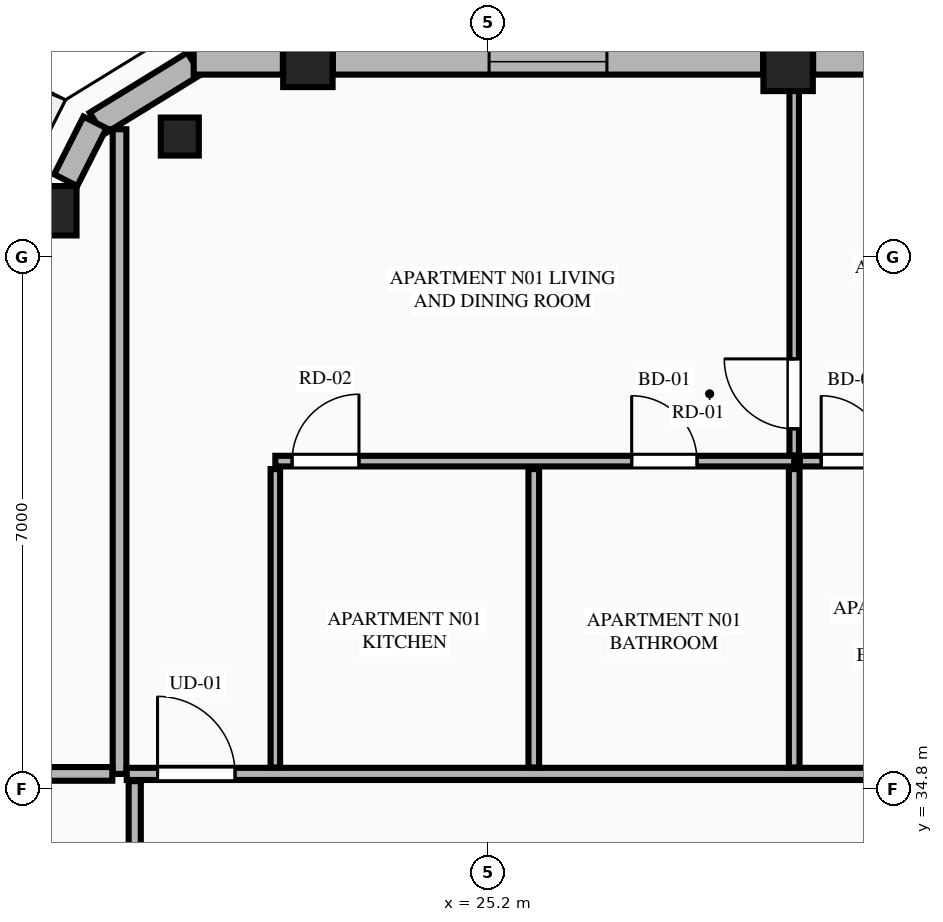
"""IFC4 building model, lengths in metres.
Left out: names, types, materials, properties, quantities, classifications, styles, units other than length and angle.
Written with IfcOpenShell. Run it as: python <this file> out.ifc"""

import sys

from ifc_helpers import new_model, si_unit, direction, frame, frame_2d, origin, origin_2d, place, context, subcontext, project, spatial, rectangle, extrude, element, fill, save


model = new_model("IFC4")
c1 = context("Model", 3, precision=1e-05, world=origin(), true_north=direction((0.0, 1.0)))
c2 = subcontext(c1, "Body", "Model", "MODEL_VIEW")
j1 = project(units=[si_unit("LENGTHUNIT", "METRE"), si_unit("PLANEANGLEUNIT", "RADIAN")], contexts=[c1])
p1 = place(None, origin())
s1 = spatial("IfcSite", under=j1, at=p1, CompositionType="ELEMENT")
p2 = place(p1, origin())
s2 = spatial("IfcBuilding", under=s1, at=p2, CompositionType="ELEMENT")
p3 = place(p2, frame((0.0, 0.0, 259.85)))
s3 = spatial("IfcBuildingStorey", under=s2, at=p3, CompositionType="ELEMENT", Elevation=259.85)
for number, where, z_axis, x_axis in (
    (1, (29.146, 44.308, 0.0), (0.0, 0.0, 1.0), (1.0, 0.0, 0.0)),
    (2, (22.828, 44.361, 0.0), (0.0, 0.0, 1.0), (1.0, 0.0, 0.0)),
    (3, (19.459, 42.409, 0.0), (0.0, 0.0, 1.0), (1.0, 0.0, 0.0)),
):
    element("IfcColumn", number, at=place(p3, frame(where, z_axis=z_axis, x_axis=x_axis)), inside=s3, PredefinedType="COLUMN", context=c2, shape_type="SweptSolid", body=[
        extrude(rectangle(XDim=0.65, YDim=0.65, at=origin_2d()), origin(), (0.0, 0.0, 1.0), 3.65),
    ])
p4 = place(p3, frame((21.143, 43.385, 0.0), z_axis=(0.0, 0.0, 1.0), x_axis=(-0.865256437757, -0.501329529272, 0.0)))
e4 = element("IfcColumn", 4, at=p4, inside=s3, PredefinedType="PILASTER", context=c2, shape_type="SweptSolid", body=[
    extrude(rectangle(XDim=0.5, YDim=0.35, at=origin_2d()), origin(), (0.0, 0.0, 1.0), 3.65),
])
p5 = place(p3, frame((21.331, 44.345, 0.0), z_axis=(0.0, 0.0, 1.0), x_axis=(-0.851680557619, -0.52406128246, 0.0)))
e5 = element("IfcWall", 5, at=p5, inside=s3, PredefinedType="STANDARD", context=c2, shape_type="SweptSolid", body=[
    extrude(rectangle(XDim=1.508, YDim=0.34, at=frame_2d((0.754, 0.0))), origin(), (0.0, 0.0, 1.0), 3.45),
])
p6 = place(p3, frame((35.325, 44.37, 0.0), z_axis=(0.0, 0.0, 1.0), x_axis=(-1.0, 0.0, 0.0)))
e6 = element("IfcWall", 6, at=p6, inside=s3, PredefinedType="STANDARD", context=c2, shape_type="SweptSolid", body=[
    extrude(rectangle(XDim=5.85, YDim=0.34, at=frame_2d((2.925, 0.0))), origin(), (0.0, 0.0, 1.0), 2.983),
])
p7 = place(p6, frame((2.375, 0.0, 0.75)))
e7 = element("IfcOpeningElement", 7, at=p7, cuts=e6, PredefinedType="OPENING", context=c2, shape_type="SweptSolid", body=[
    extrude(rectangle(XDim=1.1, YDim=2.0, at=frame_2d((0.55, 1.0))), frame((0.0, 0.18, 0.0), z_axis=(0.0, -1.0, 0.0), x_axis=(1.0, 0.0, 0.0)), (0.0, 0.0, 1.0), 0.36),
])
p8 = place(p3, frame((28.817, 44.37, 0.0), z_axis=(0.0, 0.0, 1.0), x_axis=(-1.0, 0.0, 0.0)))
e8 = element("IfcWall", 8, at=p8, inside=s3, PredefinedType="STANDARD", context=c2, shape_type="SweptSolid", body=[
    extrude(rectangle(XDim=5.66, YDim=0.34, at=frame_2d((2.83, 0.0))), origin(), (0.0, 0.0, 1.0), 2.983),
])
p9 = place(p8, frame((2.055, 0.0, 0.75)))
e9 = element("IfcOpeningElement", 9, at=p9, cuts=e8, PredefinedType="OPENING", context=c2, shape_type="SweptSolid", body=[
    extrude(rectangle(XDim=1.55, YDim=2.05, at=frame_2d((0.775, 1.025))), frame((0.0, 0.18, 0.0), z_axis=(0.0, -1.0, 0.0), x_axis=(1.0, 0.0, 0.0)), (0.0, 0.0, 1.0), 0.36),
])
p10 = place(p3, frame((22.499, 44.37, 0.0), z_axis=(0.0, 0.0, 1.0), x_axis=(-1.0, 0.0, 0.0)))
e10 = element("IfcWall", 10, at=p10, inside=s3, PredefinedType="STANDARD", context=c2, shape_type="SweptSolid", body=[
    extrude(rectangle(XDim=1.173, YDim=0.34, at=frame_2d((0.586, 0.0))), origin(), (0.0, 0.0, 1.0), 3.45),
])
p11 = place(p3, frame((20.027, 43.571, 0.0), z_axis=(0.0, 0.0, 1.0), x_axis=(-0.451907025977, -0.8920650424, 0.0)))
e11 = element("IfcWall", 11, at=p11, inside=s3, PredefinedType="STANDARD", context=c2, shape_type="SweptSolid", body=[
    extrude(rectangle(XDim=0.852, YDim=0.34, at=frame_2d((0.426, 0.0))), origin(), (0.0, 0.0, 1.0), 3.45),
])
p12 = place(p3, frame((20.35, 35.0, 0.0), z_axis=(0.0, 0.0, 1.0), x_axis=(0.0, 1.0, 0.0)))
e12 = element("IfcWall", 12, at=p12, inside=s3, PredefinedType="PARTITIONING", context=c2, shape_type="SweptSolid", body=[
    extrude(rectangle(XDim=8.481, YDim=0.18, at=frame_2d((4.24, 0.0))), origin(), (0.0, 0.0, 1.0), 3.45),
])
p13 = place(p3, frame((20.445, 35.0, 0.0), z_axis=(0.0, 0.0, 1.0), x_axis=(1.0, 0.0, 0.0)))
e13 = element("IfcWall", 13, at=p13, inside=s3, PredefinedType="PARTITIONING", context=c2, shape_type="SweptSolid", body=[
    extrude(rectangle(XDim=15.114, YDim=0.16, at=frame_2d((7.557, 0.0))), origin(), (0.0, 0.0, 1.0), 3.45),
])
p14 = place(p13, frame((0.405, 0.0, 0.0)))
e14 = element("IfcOpeningElement", 14, at=p14, cuts=e13, PredefinedType="OPENING", context=c2, shape_type="SweptSolid", body=[
    extrude(rectangle(XDim=1.02, YDim=2.25, at=frame_2d((0.51, 1.125))), frame((0.0, 0.09, 0.0), z_axis=(0.0, -1.0, 0.0), x_axis=(1.0, 0.0, 0.0)), (0.0, 0.0, 1.0), 0.18),
])
p15 = place(p3, frame((22.4, 35.085, 0.0), z_axis=(0.0, 0.0, 1.0), x_axis=(0.0, 1.0, 0.0)))
e15 = element("IfcWall", 15, at=p15, inside=s3, PredefinedType="PARTITIONING", context=c2, shape_type="SweptSolid", body=[
    extrude(rectangle(XDim=3.925, YDim=0.125, at=frame_2d((1.962, 0.0))), origin(), (0.0, 0.0, 1.0), 3.45),
])
p16 = place(p3, frame((22.4, 39.115, 0.0), z_axis=(0.0, 0.0, 1.0), x_axis=(1.0, 0.0, 0.0)))
e16 = element("IfcWall", 16, at=p16, inside=s3, PredefinedType="PLUMBINGWALL", context=c2, shape_type="SweptSolid", body=[
    extrude(rectangle(XDim=6.826, YDim=0.14, at=frame_2d((3.413, 0.0))), origin(), (0.0, 0.0, 1.0), 3.45),
])
p17 = place(p16, frame((4.688, 0.0, 0.0)))
e17 = element("IfcOpeningElement", 17, at=p17, cuts=e16, PredefinedType="OPENING", context=c2, shape_type="SweptSolid", body=[
    extrude(rectangle(XDim=0.86, YDim=2.1, at=frame_2d((0.43, 1.05))), frame((0.0, 0.08, 0.0), z_axis=(0.0, -1.0, 0.0), x_axis=(1.0, 0.0, 0.0)), (0.0, 0.0, 1.0), 0.16),
])
p18 = place(p16, frame((0.22, 0.0, 0.0)))
e18 = element("IfcOpeningElement", 18, at=p18, cuts=e16, PredefinedType="OPENING", context=c2, shape_type="SweptSolid", body=[
    extrude(rectangle(XDim=0.88, YDim=2.15, at=frame_2d((0.44, 1.075))), frame((0.0, 0.08, 0.0), z_axis=(0.0, -1.0, 0.0), x_axis=(1.0, 0.0, 0.0)), (0.0, 0.0, 1.0), 0.16),
])
p19 = place(p3, frame((29.301, 39.115, 0.0), z_axis=(0.0, 0.0, 1.0), x_axis=(1.0, 0.0, 0.0)))
e19 = element("IfcWall", 19, at=p19, inside=s3, PredefinedType="PLUMBINGWALL", context=c2, shape_type="SweptSolid", body=[
    extrude(rectangle(XDim=6.258, YDim=0.14, at=frame_2d((3.129, 0.0))), origin(), (0.0, 0.0, 1.0), 3.45),
])
p20 = place(p19, frame((0.28, 0.0, 0.0)))
e20 = element("IfcOpeningElement", 20, at=p20, cuts=e19, PredefinedType="OPENING", context=c2, shape_type="SweptSolid", body=[
    extrude(rectangle(XDim=0.86, YDim=2.1, at=frame_2d((0.43, 1.05))), frame((0.0, 0.08, 0.0), z_axis=(0.0, -1.0, 0.0), x_axis=(1.0, 0.0, 0.0)), (0.0, 0.0, 1.0), 0.16),
])
p21 = place(p19, frame((3.188, 0.0, 0.0)))
e21 = element("IfcOpeningElement", 21, at=p21, cuts=e19, PredefinedType="OPENING", context=c2, shape_type="SweptSolid", body=[
    extrude(rectangle(XDim=0.88, YDim=2.15, at=frame_2d((0.44, 1.075))), frame((0.0, 0.08, 0.0), z_axis=(0.0, -1.0, 0.0), x_axis=(1.0, 0.0, 0.0)), (0.0, 0.0, 1.0), 0.16),
])
p22 = place(p3, frame((25.8, 35.085, 0.0), z_axis=(0.0, 0.0, 1.0), x_axis=(0.0, 1.0, 0.0)))
e22 = element("IfcWall", 22, at=p22, inside=s3, PredefinedType="PLUMBINGWALL", context=c2, shape_type="SweptSolid", body=[
    extrude(rectangle(XDim=3.925, YDim=0.14, at=frame_2d((1.962, 0.0))), origin(), (0.0, 0.0, 1.0), 3.45),
])
p23 = place(p3, frame((29.226, 35.085, 0.0), z_axis=(0.0, 0.0, 1.0), x_axis=(0.0, 1.0, 0.0)))
e23 = element("IfcWall", 23, at=p23, inside=s3, PredefinedType="PLUMBINGWALL", context=c2, shape_type="SweptSolid", body=[
    extrude(rectangle(XDim=3.925, YDim=0.14, at=frame_2d((1.962, 0.0))), origin(), (0.0, 0.0, 1.0), 2.907),
])
p24 = place(p3, frame((29.226, 39.19, 0.0), z_axis=(0.0, 0.0, 1.0), x_axis=(0.0, 1.0, 0.0)))
e24 = element("IfcWall", 24, at=p24, inside=s3, PredefinedType="PARTITIONING", context=c2, shape_type="SweptSolid", body=[
    extrude(rectangle(XDim=5.095, YDim=0.125, at=frame_2d((2.547, 0.0))), origin(), (0.0, 0.0, 1.0), 2.907),
])
p25 = place(p24, frame((0.35, 0.0, 0.0)))
e25 = element("IfcOpeningElement", 25, at=p25, cuts=e24, PredefinedType="OPENING", context=c2, shape_type="SweptSolid", body=[
    extrude(rectangle(XDim=0.92, YDim=2.15, at=frame_2d((0.46, 1.075))), frame((0.0, 0.073, 0.0), z_axis=(0.0, -1.0, 0.0), x_axis=(1.0, 0.0, 0.0)), (0.0, 0.0, 1.0), 0.145),
])
p26 = place(p3, frame((15.933, 35.0, 0.0), z_axis=(0.0, 0.0, 1.0), x_axis=(1.0, 0.0, 0.0)))
e26 = element("IfcWall", 26, at=p26, inside=s3, PredefinedType="PARTITIONING", context=c2, shape_type="SweptSolid", body=[
    extrude(rectangle(XDim=4.322, YDim=0.18, at=frame_2d((2.161, 0.0))), origin(), (0.0, 0.0, 1.0), 3.45),
])
p27 = place(p3, frame((20.55, 25.051, 0.0), z_axis=(0.0, 0.0, 1.0), x_axis=(0.0, 1.0, 0.0)))
e27 = element("IfcWall", 27, at=p27, inside=s3, PredefinedType="PARTITIONING", context=c2, shape_type="SweptSolid", body=[
    extrude(rectangle(XDim=9.854, YDim=0.16, at=frame_2d((4.927, 0.0))), origin(), (0.0, 0.0, 1.0), 3.137),
])
p28 = place(p27, frame((0.45, 0.0, 0.0)))
e28 = element("IfcOpeningElement", 28, at=p28, cuts=e27, PredefinedType="OPENING", context=c2, shape_type="SweptSolid", body=[
    extrude(rectangle(XDim=1.02, YDim=2.25, at=frame_2d((0.51, 1.125))), frame((0.0, 0.09, 0.0), z_axis=(0.0, -1.0, 0.0), x_axis=(1.0, 0.0, 0.0)), (0.0, 0.0, 1.0), 0.18),
])
p29 = place(p9, origin())
e29 = element("IfcWindow", 29, at=p29, inside=s3, PartitioningType="SINGLE_PANEL", PredefinedType="WINDOW", context=c2, shape_type="SweptSolid", body=[
    extrude(rectangle(XDim=1.55, YDim=2.05, at=frame_2d((0.775, 1.025))), frame((0.0, 0.03, 0.0), z_axis=(0.0, -1.0, 0.0), x_axis=(1.0, 0.0, 0.0)), (0.0, 0.0, 1.0), 0.06),
])
fill(e9, e29)
p30 = place(p17, origin())
e30 = element("IfcDoor", 30, at=p30, inside=s3, OperationType="SINGLE_SWING_LEFT", PredefinedType="DOOR", context=c2, shape_type="SweptSolid", body=[
    extrude(rectangle(XDim=0.86, YDim=2.1, at=frame_2d((0.43, 1.05))), frame((0.0, 0.025, 0.0), z_axis=(0.0, -1.0, 0.0), x_axis=(1.0, 0.0, 0.0)), (0.0, 0.0, 1.0), 0.05),
])
fill(e17, e30)
p31 = place(p20, origin())
e31 = element("IfcDoor", 31, at=p31, inside=s3, OperationType="SINGLE_SWING_LEFT", PredefinedType="DOOR", context=c2, shape_type="SweptSolid", body=[
    extrude(rectangle(XDim=0.86, YDim=2.1, at=frame_2d((0.43, 1.05))), frame((0.0, 0.025, 0.0), z_axis=(0.0, -1.0, 0.0), x_axis=(1.0, 0.0, 0.0)), (0.0, 0.0, 1.0), 0.05),
])
fill(e20, e31)
p32 = place(p14, origin())
e32 = element("IfcDoor", 32, at=p32, inside=s3, OperationType="SINGLE_SWING_LEFT", PredefinedType="DOOR", context=c2, shape_type="SweptSolid", body=[
    extrude(rectangle(XDim=1.02, YDim=2.25, at=frame_2d((0.51, 1.125))), frame((0.0, 0.025, 0.0), z_axis=(0.0, -1.0, 0.0), x_axis=(1.0, 0.0, 0.0)), (0.0, 0.0, 1.0), 0.05),
])
fill(e14, e32)
p33 = place(p18, origin())
e33 = element("IfcDoor", 33, at=p33, inside=s3, OperationType="SINGLE_SWING_RIGHT", PredefinedType="DOOR", context=c2, shape_type="SweptSolid", body=[
    extrude(rectangle(XDim=0.88, YDim=2.15, at=frame_2d((0.44, 1.075))), frame((0.0, 0.025, 0.0), z_axis=(0.0, -1.0, 0.0), x_axis=(1.0, 0.0, 0.0)), (0.0, 0.0, 1.0), 0.05),
])
fill(e18, e33)
p34 = place(p25, origin())
e34 = element("IfcDoor", 34, at=p34, inside=s3, OperationType="SINGLE_SWING_RIGHT", PredefinedType="DOOR", context=c2, shape_type="SweptSolid", body=[
    extrude(rectangle(XDim=0.92, YDim=2.15, at=frame_2d((0.46, 1.075))), frame((0.0, 0.025, 0.0), z_axis=(0.0, -1.0, 0.0), x_axis=(1.0, 0.0, 0.0)), (0.0, 0.0, 1.0), 0.05),
])
fill(e25, e34)
save(model, sys.argv[1])
